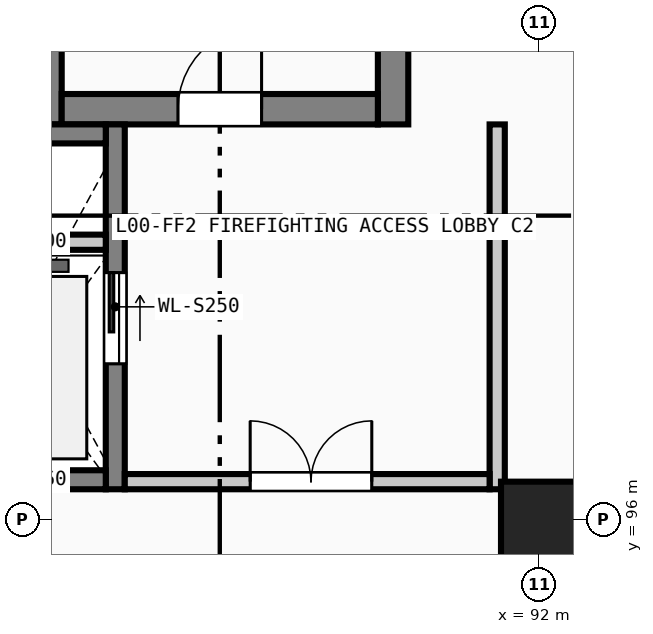
"""IFC4 building model, lengths in metres.
Left out: names, types, materials, properties, quantities, classifications, styles, units other than length and angle.
Written with IfcOpenShell. Run it as: python <this file> out.ifc"""

import sys

from ifc_helpers import new_model, si_unit, direction, frame, frame_2d, origin, origin_2d, place, context, subcontext, project, spatial, rectangle, extrude, element, fill, save


model = new_model("IFC4")
c1 = context("Model", 3, precision=1e-05, world=origin(), true_north=direction((0.0, 1.0)))
c2 = subcontext(c1, "Body", "Model", "MODEL_VIEW")
j1 = project(units=[si_unit("LENGTHUNIT", "METRE"), si_unit("PLANEANGLEUNIT", "RADIAN")], contexts=[c1])
p1 = place(None, origin())
s1 = spatial("IfcSite", under=j1, at=p1, CompositionType="ELEMENT")
p2 = place(p1, origin())
s2 = spatial("IfcBuilding", under=s1, at=p2, CompositionType="ELEMENT")
p3 = place(p2, origin())
s3 = spatial("IfcBuildingStorey", under=s2, at=p3, CompositionType="ELEMENT", Elevation=0.0)
p4 = place(p3, frame((92.0, 96.0, 0.0), z_axis=(0.0, 0.0, 1.0), x_axis=(1.0, 0.0, 0.0)))
e1 = element("IfcColumn", 1, at=p4, inside=s3, PredefinedType="COLUMN", context=c2, shape_type="SweptSolid", body=[
    extrude(rectangle(XDim=1.0, YDim=1.0, at=origin_2d()), origin(), (0.0, 0.0, 1.0), 4.8),
])
for number, where, z_axis, x_axis in (
    (2, (85.52, 101.2, 0.0), (0.0, 0.0, 1.0), (0.0, 1.0, 0.0)),
    (3, (90.08, 110.4, 0.0), (0.0, 0.0, 1.0), (0.0, -1.0, 0.0)),
):
    element("IfcWall", number, at=place(p3, frame(where, z_axis=z_axis, x_axis=x_axis)), inside=s3, PredefinedType="SHEAR", context=c2, shape_type="SweptSolid", body=[
        extrude(rectangle(XDim=9.2, YDim=0.4, at=frame_2d((4.6, 0.0))), origin(), (0.0, 0.0, 1.0), 4.525),
    ])
p5 = place(p3, frame((89.88, 101.4, 0.0), z_axis=(0.0, 0.0, 1.0), x_axis=(-1.0, 0.0, 0.0)))
e4 = element("IfcWall", 4, at=p5, inside=s3, PredefinedType="SHEAR", context=c2, shape_type="SweptSolid", body=[
    extrude(rectangle(XDim=4.16, YDim=0.4, at=frame_2d((2.08, 0.0))), origin(), (0.0, 0.0, 1.0), 4.525),
])
p6 = place(p5, frame((1.53, 0.0, 0.0)))
e5 = element("IfcOpeningElement", 5, at=p6, cuts=e4, PredefinedType="OPENING", context=c2, shape_type="SweptSolid", body=[
    extrude(rectangle(XDim=1.1, YDim=2.2, at=frame_2d((0.55, 1.1))), frame((0.0, 0.21, 0.0), z_axis=(0.0, -1.0, 0.0), x_axis=(1.0, 0.0, 0.0)), (0.0, 0.0, 1.0), 0.42),
])
p7 = place(p3, frame((86.425, 101.2, 0.0), z_axis=(0.0, 0.0, 1.0), x_axis=(0.0, -1.0, 0.0)))
e6 = element("IfcWall", 6, at=p7, inside=s3, PredefinedType="SOLIDWALL", context=c2, shape_type="SweptSolid", body=[
    extrude(rectangle(XDim=4.8, YDim=0.25, at=frame_2d((2.4, 0.0))), origin(), (0.0, 0.0, 1.0), 4.525),
])
p8 = place(p7, frame((1.95, 0.0, 0.0)))
e7 = element("IfcOpeningElement", 7, at=p8, cuts=e6, PredefinedType="OPENING", context=c2, shape_type="SweptSolid", body=[
    extrude(rectangle(XDim=1.2, YDim=2.2, at=frame_2d((0.6, 1.1))), frame((0.0, 0.135, 0.0), z_axis=(0.0, -1.0, 0.0), x_axis=(1.0, 0.0, 0.0)), (0.0, 0.0, 1.0), 0.27),
])
for number, where, z_axis, x_axis in (
    (8, (86.3, 96.525, 0.0), (0.0, 0.0, 1.0), (-1.0, 0.0, 0.0)),
    (9, (84.2, 101.075, 0.0), (0.0, 0.0, 1.0), (1.0, 0.0, 0.0)),
):
    element("IfcWall", number, at=place(p3, frame(where, z_axis=z_axis, x_axis=x_axis)), inside=s3, PredefinedType="SOLIDWALL", context=c2, shape_type="SweptSolid", body=[
        extrude(rectangle(XDim=2.1, YDim=0.25, at=frame_2d((1.05, 0.0))), origin(), (0.0, 0.0, 1.0), 4.525),
    ])
p9 = place(p3, frame((84.2, 99.65, 0.0), z_axis=(0.0, 0.0, 1.0), x_axis=(1.0, 0.0, 0.0)))
e10 = element("IfcWall", 10, at=p9, inside=s3, PredefinedType="SOLIDWALL", context=c2, shape_type="SweptSolid", body=[
    extrude(rectangle(XDim=2.1, YDim=0.2, at=frame_2d((1.05, 0.0))), origin(), (0.0, 0.0, 1.0), 4.525),
])
p10 = place(p3, frame((91.45, 101.2, 0.0), z_axis=(0.0, 0.0, 1.0), x_axis=(0.0, -1.0, 0.0)))
e11 = element("IfcWall", 11, at=p10, inside=s3, PredefinedType="SOLIDWALL", context=c2, shape_type="SweptSolid", body=[
    extrude(rectangle(XDim=4.8, YDim=0.2, at=frame_2d((2.4, 0.0))), origin(), (0.0, 0.0, 1.0), 4.525),
])
p11 = place(p3, frame((91.35, 96.5, 0.0), z_axis=(0.0, 0.0, 1.0), x_axis=(-1.0, 0.0, 0.0)))
e12 = element("IfcWall", 12, at=p11, inside=s3, PredefinedType="SOLIDWALL", context=c2, shape_type="SweptSolid", body=[
    extrude(rectangle(XDim=4.8, YDim=0.2, at=frame_2d((2.4, 0.0))), origin(), (0.0, 0.0, 1.0), 4.525),
])
p12 = place(p11, frame((1.55, 0.0, 0.0)))
e13 = element("IfcOpeningElement", 13, at=p12, cuts=e12, PredefinedType="OPENING", context=c2, shape_type="SweptSolid", body=[
    extrude(rectangle(XDim=1.6, YDim=2.2, at=frame_2d((0.8, 1.1))), frame((0.0, 0.11, 0.0), z_axis=(0.0, -1.0, 0.0), x_axis=(1.0, 0.0, 0.0)), (0.0, 0.0, 1.0), 0.22),
])
p13 = place(p6, frame((1.1, 0.0, 0.0), z_axis=(0.0, 0.0, 1.0), x_axis=(-1.0, 0.0, 0.0)))
e14 = element("IfcDoor", 14, at=p13, inside=s3, OperationType="SINGLE_SWING_RIGHT", PredefinedType="DOOR", context=c2, shape_type="SweptSolid", body=[
    extrude(rectangle(XDim=1.1, YDim=2.2, at=frame_2d((0.55, 1.1))), frame((0.0, 0.025, 0.0), z_axis=(0.0, -1.0, 0.0), x_axis=(1.0, 0.0, 0.0)), (0.0, 0.0, 1.0), 0.05),
])
fill(e5, e14)
p14 = place(p8, origin())
e15 = element("IfcDoor", 15, at=p14, inside=s3, OperationType="SLIDING_TO_LEFT", PredefinedType="DOOR", context=c2, shape_type="SweptSolid", body=[
    extrude(rectangle(XDim=1.2, YDim=2.2, at=frame_2d((0.6, 1.1))), frame((0.0, 0.025, 0.0), z_axis=(0.0, -1.0, 0.0), x_axis=(1.0, 0.0, 0.0)), (0.0, 0.0, 1.0), 0.05),
])
fill(e7, e15)
p15 = place(p12, frame((1.6, 0.0, 0.0), z_axis=(0.0, 0.0, 1.0), x_axis=(-1.0, 0.0, 0.0)))
e16 = element("IfcDoor", 16, at=p15, inside=s3, OperationType="DOUBLE_DOOR_SINGLE_SWING", PredefinedType="DOOR", context=c2, shape_type="SweptSolid", body=[
    extrude(rectangle(XDim=1.6, YDim=2.2, at=frame_2d((0.8, 1.1))), frame((0.0, 0.025, 0.0), z_axis=(0.0, -1.0, 0.0), x_axis=(1.0, 0.0, 0.0)), (0.0, 0.0, 1.0), 0.05),
])
fill(e13, e16)
save(model, sys.argv[1])
